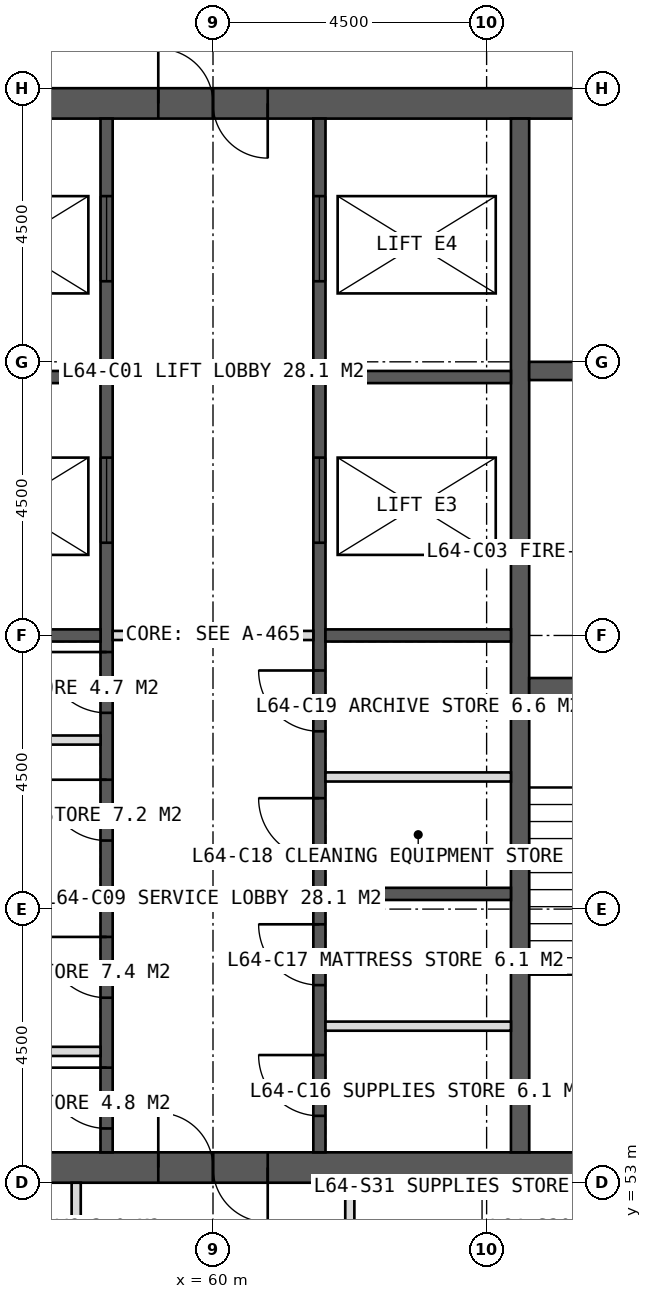
"""IFC4 building model, lengths in metres.
Left out: names, types, materials, properties, quantities, classifications, styles, units other than length and angle.
Written with IfcOpenShell. Run it as: python <this file> out.ifc"""

import sys

from ifc_helpers import new_model, si_unit, direction, frame, frame_2d, origin, place, context, subcontext, project, spatial, rectangle, extrude, element, fill, save


model = new_model("IFC4")
c1 = context("Model", 3, precision=1e-05, world=origin(), true_north=direction((0.0, 1.0)))
c2 = subcontext(c1, "Body", "Model", "MODEL_VIEW")
j1 = project(units=[si_unit("LENGTHUNIT", "METRE"), si_unit("PLANEANGLEUNIT", "RADIAN")], contexts=[c1])
p1 = place(None, origin())
s1 = spatial("IfcSite", under=j1, at=p1, CompositionType="ELEMENT")
p2 = place(p1, origin())
s2 = spatial("IfcBuilding", under=s1, at=p2, CompositionType="ELEMENT")
p3 = place(p2, frame((0.0, 0.0, 266.0)))
s3 = spatial("IfcBuildingStorey", under=s2, at=p3, CompositionType="ELEMENT", Elevation=266.0)
p4 = place(p3, frame((51.0, 70.75, 0.0), z_axis=(0.0, 0.0, 1.0), x_axis=(1.0, 0.0, 0.0)))
e1 = element("IfcWall", 1, at=p4, inside=s3, PredefinedType="SHEAR", context=c2, shape_type="SweptSolid", body=[
    extrude(rectangle(XDim=18.0, YDim=0.5, at=frame_2d((9.0, 0.0))), origin(), (0.0, 0.0, 1.0), 4.0),
])
p5 = place(p4, frame((8.1, 0.0, 0.0)))
e2 = element("IfcOpeningElement", 2, at=p5, cuts=e1, PredefinedType="OPENING", context=c2, shape_type="SweptSolid", body=[
    extrude(rectangle(XDim=1.8, YDim=2.2, at=frame_2d((0.9, 1.1))), frame((0.0, 0.26, 0.0), z_axis=(0.0, -1.0, 0.0), x_axis=(1.0, 0.0, 0.0)), (0.0, 0.0, 1.0), 0.52),
])
p6 = place(p3, frame((51.0, 53.25, 0.0), z_axis=(0.0, 0.0, 1.0), x_axis=(1.0, 0.0, 0.0)))
e3 = element("IfcWall", 3, at=p6, inside=s3, PredefinedType="SHEAR", context=c2, shape_type="SweptSolid", body=[
    extrude(rectangle(XDim=18.0, YDim=0.5, at=frame_2d((9.0, 0.0))), origin(), (0.0, 0.0, 1.0), 4.0),
])
p7 = place(p6, frame((8.1, 0.0, 0.0)))
e4 = element("IfcOpeningElement", 4, at=p7, cuts=e3, PredefinedType="OPENING", context=c2, shape_type="SweptSolid", body=[
    extrude(rectangle(XDim=1.8, YDim=2.2, at=frame_2d((0.9, 1.1))), frame((0.0, 0.26, 0.0), z_axis=(0.0, -1.0, 0.0), x_axis=(1.0, 0.0, 0.0)), (0.0, 0.0, 1.0), 0.52),
])
p8 = place(p3, frame((65.05, 53.5, 0.0), z_axis=(0.0, 0.0, 1.0), x_axis=(0.0, 1.0, 0.0)))
e5 = element("IfcWall", 5, at=p8, inside=s3, PredefinedType="SHEAR", context=c2, shape_type="SweptSolid", body=[
    extrude(rectangle(XDim=17.0, YDim=0.3, at=frame_2d((8.5, 0.0))), origin(), (0.0, 0.0, 1.0), 4.0),
])
p9 = place(p3, frame((58.25, 53.5, 0.0), z_axis=(0.0, 0.0, 1.0), x_axis=(0.0, 1.0, 0.0)))
e6 = element("IfcWall", 6, at=p9, inside=s3, PredefinedType="SHEAR", context=c2, shape_type="SweptSolid", body=[
    extrude(rectangle(XDim=17.0, YDim=0.2, at=frame_2d((8.5, 0.0))), origin(), (0.0, 0.0, 1.0), 4.0),
])
p10 = place(p9, frame((0.393, 0.0, 0.0)))
e7 = element("IfcOpeningElement", 7, at=p10, cuts=e6, PredefinedType="OPENING", context=c2, shape_type="SweptSolid", body=[
    extrude(rectangle(XDim=1.0, YDim=2.1, at=frame_2d((0.5, 1.05))), frame((0.0, 0.11, 0.0), z_axis=(0.0, -1.0, 0.0), x_axis=(1.0, 0.0, 0.0)), (0.0, 0.0, 1.0), 0.22),
])
p11 = place(p9, frame((2.542, 0.0, 0.0)))
e8 = element("IfcOpeningElement", 8, at=p11, cuts=e6, PredefinedType="OPENING", context=c2, shape_type="SweptSolid", body=[
    extrude(rectangle(XDim=1.0, YDim=2.1, at=frame_2d((0.5, 1.05))), frame((0.0, 0.11, 0.0), z_axis=(0.0, -1.0, 0.0), x_axis=(1.0, 0.0, 0.0)), (0.0, 0.0, 1.0), 0.22),
])
p12 = place(p9, frame((5.127, 0.0, 0.0)))
e9 = element("IfcOpeningElement", 9, at=p12, cuts=e6, PredefinedType="OPENING", context=c2, shape_type="SweptSolid", body=[
    extrude(rectangle(XDim=1.0, YDim=2.1, at=frame_2d((0.5, 1.05))), frame((0.0, 0.11, 0.0), z_axis=(0.0, -1.0, 0.0), x_axis=(1.0, 0.0, 0.0)), (0.0, 0.0, 1.0), 0.22),
])
p13 = place(p9, frame((7.228, 0.0, 0.0)))
e10 = element("IfcOpeningElement", 10, at=p13, cuts=e6, PredefinedType="OPENING", context=c2, shape_type="SweptSolid", body=[
    extrude(rectangle(XDim=1.0, YDim=2.1, at=frame_2d((0.5, 1.05))), frame((0.0, 0.11, 0.0), z_axis=(0.0, -1.0, 0.0), x_axis=(1.0, 0.0, 0.0)), (0.0, 0.0, 1.0), 0.22),
])
p14 = place(p9, frame((10.025, 0.0, 0.0)))
e11 = element("IfcOpeningElement", 11, at=p14, cuts=e6, PredefinedType="OPENING", context=c2, shape_type="SweptSolid", body=[
    extrude(rectangle(XDim=1.4, YDim=2.2, at=frame_2d((0.7, 1.1))), frame((0.0, 0.11, 0.0), z_axis=(0.0, -1.0, 0.0), x_axis=(1.0, 0.0, 0.0)), (0.0, 0.0, 1.0), 0.22),
])
p15 = place(p9, frame((14.325, 0.0, 0.0)))
e12 = element("IfcOpeningElement", 12, at=p15, cuts=e6, PredefinedType="OPENING", context=c2, shape_type="SweptSolid", body=[
    extrude(rectangle(XDim=1.4, YDim=2.2, at=frame_2d((0.7, 1.1))), frame((0.0, 0.11, 0.0), z_axis=(0.0, -1.0, 0.0), x_axis=(1.0, 0.0, 0.0)), (0.0, 0.0, 1.0), 0.22),
])
p16 = place(p3, frame((61.75, 53.5, 0.0), z_axis=(0.0, 0.0, 1.0), x_axis=(0.0, 1.0, 0.0)))
e13 = element("IfcWall", 13, at=p16, inside=s3, PredefinedType="SHEAR", context=c2, shape_type="SweptSolid", body=[
    extrude(rectangle(XDim=17.0, YDim=0.2, at=frame_2d((8.5, 0.0))), origin(), (0.0, 0.0, 1.0), 4.0),
])
p17 = place(p16, frame((0.6, 0.0, 0.0)))
e14 = element("IfcOpeningElement", 14, at=p17, cuts=e13, PredefinedType="OPENING", context=c2, shape_type="SweptSolid", body=[
    extrude(rectangle(XDim=1.0, YDim=2.1, at=frame_2d((0.5, 1.05))), frame((0.0, 0.11, 0.0), z_axis=(0.0, -1.0, 0.0), x_axis=(1.0, 0.0, 0.0)), (0.0, 0.0, 1.0), 0.22),
])
p18 = place(p16, frame((2.75, 0.0, 0.0)))
e15 = element("IfcOpeningElement", 15, at=p18, cuts=e13, PredefinedType="OPENING", context=c2, shape_type="SweptSolid", body=[
    extrude(rectangle(XDim=1.0, YDim=2.1, at=frame_2d((0.5, 1.05))), frame((0.0, 0.11, 0.0), z_axis=(0.0, -1.0, 0.0), x_axis=(1.0, 0.0, 0.0)), (0.0, 0.0, 1.0), 0.22),
])
p19 = place(p16, frame((4.824, 0.0, 0.0)))
e16 = element("IfcOpeningElement", 16, at=p19, cuts=e13, PredefinedType="OPENING", context=c2, shape_type="SweptSolid", body=[
    extrude(rectangle(XDim=1.0, YDim=2.1, at=frame_2d((0.5, 1.05))), frame((0.0, 0.11, 0.0), z_axis=(0.0, -1.0, 0.0), x_axis=(1.0, 0.0, 0.0)), (0.0, 0.0, 1.0), 0.22),
])
p20 = place(p16, frame((6.924, 0.0, 0.0)))
e17 = element("IfcOpeningElement", 17, at=p20, cuts=e13, PredefinedType="OPENING", context=c2, shape_type="SweptSolid", body=[
    extrude(rectangle(XDim=1.0, YDim=2.1, at=frame_2d((0.5, 1.05))), frame((0.0, 0.11, 0.0), z_axis=(0.0, -1.0, 0.0), x_axis=(1.0, 0.0, 0.0)), (0.0, 0.0, 1.0), 0.22),
])
p21 = place(p16, frame((10.025, 0.0, 0.0)))
e18 = element("IfcOpeningElement", 18, at=p21, cuts=e13, PredefinedType="OPENING", context=c2, shape_type="SweptSolid", body=[
    extrude(rectangle(XDim=1.4, YDim=2.2, at=frame_2d((0.7, 1.1))), frame((0.0, 0.11, 0.0), z_axis=(0.0, -1.0, 0.0), x_axis=(1.0, 0.0, 0.0)), (0.0, 0.0, 1.0), 0.22),
])
p22 = place(p16, frame((14.325, 0.0, 0.0)))
e19 = element("IfcOpeningElement", 19, at=p22, cuts=e13, PredefinedType="OPENING", context=c2, shape_type="SweptSolid", body=[
    extrude(rectangle(XDim=1.4, YDim=2.2, at=frame_2d((0.7, 1.1))), frame((0.0, 0.11, 0.0), z_axis=(0.0, -1.0, 0.0), x_axis=(1.0, 0.0, 0.0)), (0.0, 0.0, 1.0), 0.22),
])
for number, where, z_axis, x_axis in (
    (20, (55.1, 57.75, 0.0), (0.0, 0.0, 1.0), (1.0, 0.0, 0.0)),
    (21, (61.85, 57.75, 0.0), (0.0, 0.0, 1.0), (1.0, 0.0, 0.0)),
    (22, (55.1, 62.0, 0.0), (0.0, 0.0, 1.0), (1.0, 0.0, 0.0)),
    (23, (61.85, 62.0, 0.0), (0.0, 0.0, 1.0), (1.0, 0.0, 0.0)),
    (24, (55.1, 66.25, 0.0), (0.0, 0.0, 1.0), (1.0, 0.0, 0.0)),
    (25, (61.85, 66.25, 0.0), (0.0, 0.0, 1.0), (1.0, 0.0, 0.0)),
):
    element("IfcWall", number, at=place(p3, frame(where, z_axis=z_axis, x_axis=x_axis)), inside=s3, PredefinedType="SHEAR", context=c2, shape_type="SweptSolid", body=[
        extrude(rectangle(XDim=3.05, YDim=0.2, at=frame_2d((1.525, 0.0))), origin(), (0.0, 0.0, 1.0), 4.0),
    ])
p23 = place(p3, frame((65.2, 61.15, 0.0), z_axis=(0.0, 0.0, 1.0), x_axis=(1.0, 0.0, 0.0)))
e26 = element("IfcWall", 26, at=p23, inside=s3, PredefinedType="SHEAR", context=c2, shape_type="SweptSolid", body=[
    extrude(rectangle(XDim=3.3, YDim=0.3, at=frame_2d((1.65, 0.0))), origin(), (0.0, 0.0, 1.0), 4.0),
])
p24 = place(p23, frame((1.05, 0.0, 0.0)))
e27 = element("IfcOpeningElement", 27, at=p24, cuts=e26, PredefinedType="OPENING", context=c2, shape_type="SweptSolid", body=[
    extrude(rectangle(XDim=1.2, YDim=2.1, at=frame_2d((0.6, 1.05))), frame((0.0, 0.16, 0.0), z_axis=(0.0, -1.0, 0.0), x_axis=(1.0, 0.0, 0.0)), (0.0, 0.0, 1.0), 0.32),
])
p25 = place(p3, frame((65.2, 66.35, 0.0), z_axis=(0.0, 0.0, 1.0), x_axis=(1.0, 0.0, 0.0)))
e28 = element("IfcWall", 28, at=p25, inside=s3, PredefinedType="SHEAR", context=c2, shape_type="SweptSolid", body=[
    extrude(rectangle(XDim=3.3, YDim=0.3, at=frame_2d((1.65, 0.0))), origin(), (0.0, 0.0, 1.0), 4.0),
])
p26 = place(p25, frame((1.05, 0.0, 0.0)))
e29 = element("IfcOpeningElement", 29, at=p26, cuts=e28, PredefinedType="OPENING", context=c2, shape_type="SweptSolid", body=[
    extrude(rectangle(XDim=1.2, YDim=2.2, at=frame_2d((0.6, 1.1))), frame((0.0, 0.16, 0.0), z_axis=(0.0, -1.0, 0.0), x_axis=(1.0, 0.0, 0.0)), (0.0, 0.0, 1.0), 0.32),
])
for number, where, z_axis, x_axis in (
    (30, (62.25, 53.0, 0.0), (0.0, 0.0, 1.0), (0.0, -1.0, 0.0)),
    (31, (57.75, 53.0, 0.0), (0.0, 0.0, 1.0), (0.0, -1.0, 0.0)),
):
    element("IfcWall", number, at=place(p3, frame(where, z_axis=z_axis, x_axis=x_axis)), inside=s3, PredefinedType="PARTITIONING", context=c2, shape_type="SweptSolid", body=[
        extrude(rectangle(XDim=1.5, YDim=0.15, at=frame_2d((0.75, 0.0))), origin(), (0.0, 0.0, 1.0), 3.75),
    ])
for number, where, z_axis, x_axis in (
    (32, (55.1, 55.16, 0.0), (0.0, 0.0, 1.0), (1.0, 0.0, 0.0)),
    (33, (61.85, 55.575, 0.0), (0.0, 0.0, 1.0), (1.0, 0.0, 0.0)),
    (34, (55.1, 60.28, 0.0), (0.0, 0.0, 1.0), (1.0, 0.0, 0.0)),
    (35, (61.85, 59.673, 0.0), (0.0, 0.0, 1.0), (1.0, 0.0, 0.0)),
):
    element("IfcWall", number, at=place(p3, frame(where, z_axis=z_axis, x_axis=x_axis)), inside=s3, PredefinedType="PARTITIONING", context=c2, shape_type="SweptSolid", body=[
        extrude(rectangle(XDim=3.05, YDim=0.15, at=frame_2d((1.525, 0.0))), origin(), (0.0, 0.0, 1.0), 3.75),
    ])
p27 = place(p3, frame((58.35, 62.0, 0.0), z_axis=(0.0, 0.0, 1.0), x_axis=(1.0, 0.0, 0.0)))
e36 = element("IfcWall", 36, at=p27, inside=s3, PredefinedType="PARTITIONING", context=c2, shape_type="SweptSolid", body=[
    extrude(rectangle(XDim=3.3, YDim=0.15, at=frame_2d((1.65, 0.0))), origin(), (0.0, 0.0, 1.0), 3.75),
])
p28 = place(p5, origin())
e37 = element("IfcDoor", 37, at=p28, inside=s3, OperationType="DOUBLE_DOOR_SINGLE_SWING", PredefinedType="DOOR", context=c2, shape_type="SweptSolid", body=[
    extrude(rectangle(XDim=1.8, YDim=2.2, at=frame_2d((0.9, 1.1))), frame((0.0, 0.025, 0.0), z_axis=(0.0, -1.0, 0.0), x_axis=(1.0, 0.0, 0.0)), (0.0, 0.0, 1.0), 0.05),
])
fill(e2, e37)
p29 = place(p10, origin())
e38 = element("IfcDoor", 38, at=p29, inside=s3, OperationType="SINGLE_SWING_RIGHT", PredefinedType="DOOR", context=c2, shape_type="SweptSolid", body=[
    extrude(rectangle(XDim=1.0, YDim=2.1, at=frame_2d((0.5, 1.05))), frame((0.0, 0.025, 0.0), z_axis=(0.0, -1.0, 0.0), x_axis=(1.0, 0.0, 0.0)), (0.0, 0.0, 1.0), 0.05),
])
fill(e7, e38)
p30 = place(p11, origin())
e39 = element("IfcDoor", 39, at=p30, inside=s3, OperationType="SINGLE_SWING_RIGHT", PredefinedType="DOOR", context=c2, shape_type="SweptSolid", body=[
    extrude(rectangle(XDim=1.0, YDim=2.1, at=frame_2d((0.5, 1.05))), frame((0.0, 0.025, 0.0), z_axis=(0.0, -1.0, 0.0), x_axis=(1.0, 0.0, 0.0)), (0.0, 0.0, 1.0), 0.05),
])
fill(e8, e39)
p31 = place(p17, origin())
e40 = element("IfcDoor", 40, at=p31, inside=s3, OperationType="SINGLE_SWING_RIGHT", PredefinedType="DOOR", context=c2, shape_type="SweptSolid", body=[
    extrude(rectangle(XDim=1.0, YDim=2.1, at=frame_2d((0.5, 1.05))), frame((0.0, 0.025, 0.0), z_axis=(0.0, -1.0, 0.0), x_axis=(1.0, 0.0, 0.0)), (0.0, 0.0, 1.0), 0.05),
])
fill(e14, e40)
p32 = place(p18, origin())
e41 = element("IfcDoor", 41, at=p32, inside=s3, OperationType="SINGLE_SWING_RIGHT", PredefinedType="DOOR", context=c2, shape_type="SweptSolid", body=[
    extrude(rectangle(XDim=1.0, YDim=2.1, at=frame_2d((0.5, 1.05))), frame((0.0, 0.025, 0.0), z_axis=(0.0, -1.0, 0.0), x_axis=(1.0, 0.0, 0.0)), (0.0, 0.0, 1.0), 0.05),
])
fill(e15, e41)
p33 = place(p12, origin())
e42 = element("IfcDoor", 42, at=p33, inside=s3, OperationType="SINGLE_SWING_RIGHT", PredefinedType="DOOR", context=c2, shape_type="SweptSolid", body=[
    extrude(rectangle(XDim=1.0, YDim=2.1, at=frame_2d((0.5, 1.05))), frame((0.0, 0.025, 0.0), z_axis=(0.0, -1.0, 0.0), x_axis=(1.0, 0.0, 0.0)), (0.0, 0.0, 1.0), 0.05),
])
fill(e9, e42)
p34 = place(p13, origin())
e43 = element("IfcDoor", 43, at=p34, inside=s3, OperationType="SINGLE_SWING_RIGHT", PredefinedType="DOOR", context=c2, shape_type="SweptSolid", body=[
    extrude(rectangle(XDim=1.0, YDim=2.1, at=frame_2d((0.5, 1.05))), frame((0.0, 0.025, 0.0), z_axis=(0.0, -1.0, 0.0), x_axis=(1.0, 0.0, 0.0)), (0.0, 0.0, 1.0), 0.05),
])
fill(e10, e43)
p35 = place(p19, origin())
e44 = element("IfcDoor", 44, at=p35, inside=s3, OperationType="SINGLE_SWING_RIGHT", PredefinedType="DOOR", context=c2, shape_type="SweptSolid", body=[
    extrude(rectangle(XDim=1.0, YDim=2.1, at=frame_2d((0.5, 1.05))), frame((0.0, 0.025, 0.0), z_axis=(0.0, -1.0, 0.0), x_axis=(1.0, 0.0, 0.0)), (0.0, 0.0, 1.0), 0.05),
])
fill(e16, e44)
p36 = place(p20, origin())
e45 = element("IfcDoor", 45, at=p36, inside=s3, OperationType="SINGLE_SWING_RIGHT", PredefinedType="DOOR", context=c2, shape_type="SweptSolid", body=[
    extrude(rectangle(XDim=1.0, YDim=2.1, at=frame_2d((0.5, 1.05))), frame((0.0, 0.025, 0.0), z_axis=(0.0, -1.0, 0.0), x_axis=(1.0, 0.0, 0.0)), (0.0, 0.0, 1.0), 0.05),
])
fill(e17, e45)
p37 = place(p14, origin())
e46 = element("IfcDoor", 46, at=p37, inside=s3, OperationType="SLIDING_TO_LEFT", PredefinedType="DOOR", context=c2, shape_type="SweptSolid", body=[
    extrude(rectangle(XDim=1.4, YDim=2.2, at=frame_2d((0.7, 1.1))), frame((0.0, 0.025, 0.0), z_axis=(0.0, -1.0, 0.0), x_axis=(1.0, 0.0, 0.0)), (0.0, 0.0, 1.0), 0.05),
])
fill(e11, e46)
p38 = place(p21, origin())
e47 = element("IfcDoor", 47, at=p38, inside=s3, OperationType="SLIDING_TO_LEFT", PredefinedType="DOOR", context=c2, shape_type="SweptSolid", body=[
    extrude(rectangle(XDim=1.4, YDim=2.2, at=frame_2d((0.7, 1.1))), frame((0.0, 0.025, 0.0), z_axis=(0.0, -1.0, 0.0), x_axis=(1.0, 0.0, 0.0)), (0.0, 0.0, 1.0), 0.05),
])
fill(e18, e47)
p39 = place(p15, origin())
e48 = element("IfcDoor", 48, at=p39, inside=s3, OperationType="SLIDING_TO_LEFT", PredefinedType="DOOR", context=c2, shape_type="SweptSolid", body=[
    extrude(rectangle(XDim=1.4, YDim=2.2, at=frame_2d((0.7, 1.1))), frame((0.0, 0.025, 0.0), z_axis=(0.0, -1.0, 0.0), x_axis=(1.0, 0.0, 0.0)), (0.0, 0.0, 1.0), 0.05),
])
fill(e12, e48)
p40 = place(p22, origin())
e49 = element("IfcDoor", 49, at=p40, inside=s3, OperationType="SLIDING_TO_LEFT", PredefinedType="DOOR", context=c2, shape_type="SweptSolid", body=[
    extrude(rectangle(XDim=1.4, YDim=2.2, at=frame_2d((0.7, 1.1))), frame((0.0, 0.025, 0.0), z_axis=(0.0, -1.0, 0.0), x_axis=(1.0, 0.0, 0.0)), (0.0, 0.0, 1.0), 0.05),
])
fill(e19, e49)
p41 = place(p7, origin())
e50 = element("IfcDoor", 50, at=p41, inside=s3, OperationType="DOUBLE_DOOR_SINGLE_SWING", PredefinedType="DOOR", context=c2, shape_type="SweptSolid", body=[
    extrude(rectangle(XDim=1.8, YDim=2.2, at=frame_2d((0.9, 1.1))), frame((0.0, 0.025, 0.0), z_axis=(0.0, -1.0, 0.0), x_axis=(1.0, 0.0, 0.0)), (0.0, 0.0, 1.0), 0.05),
])
fill(e4, e50)
save(model, sys.argv[1])
